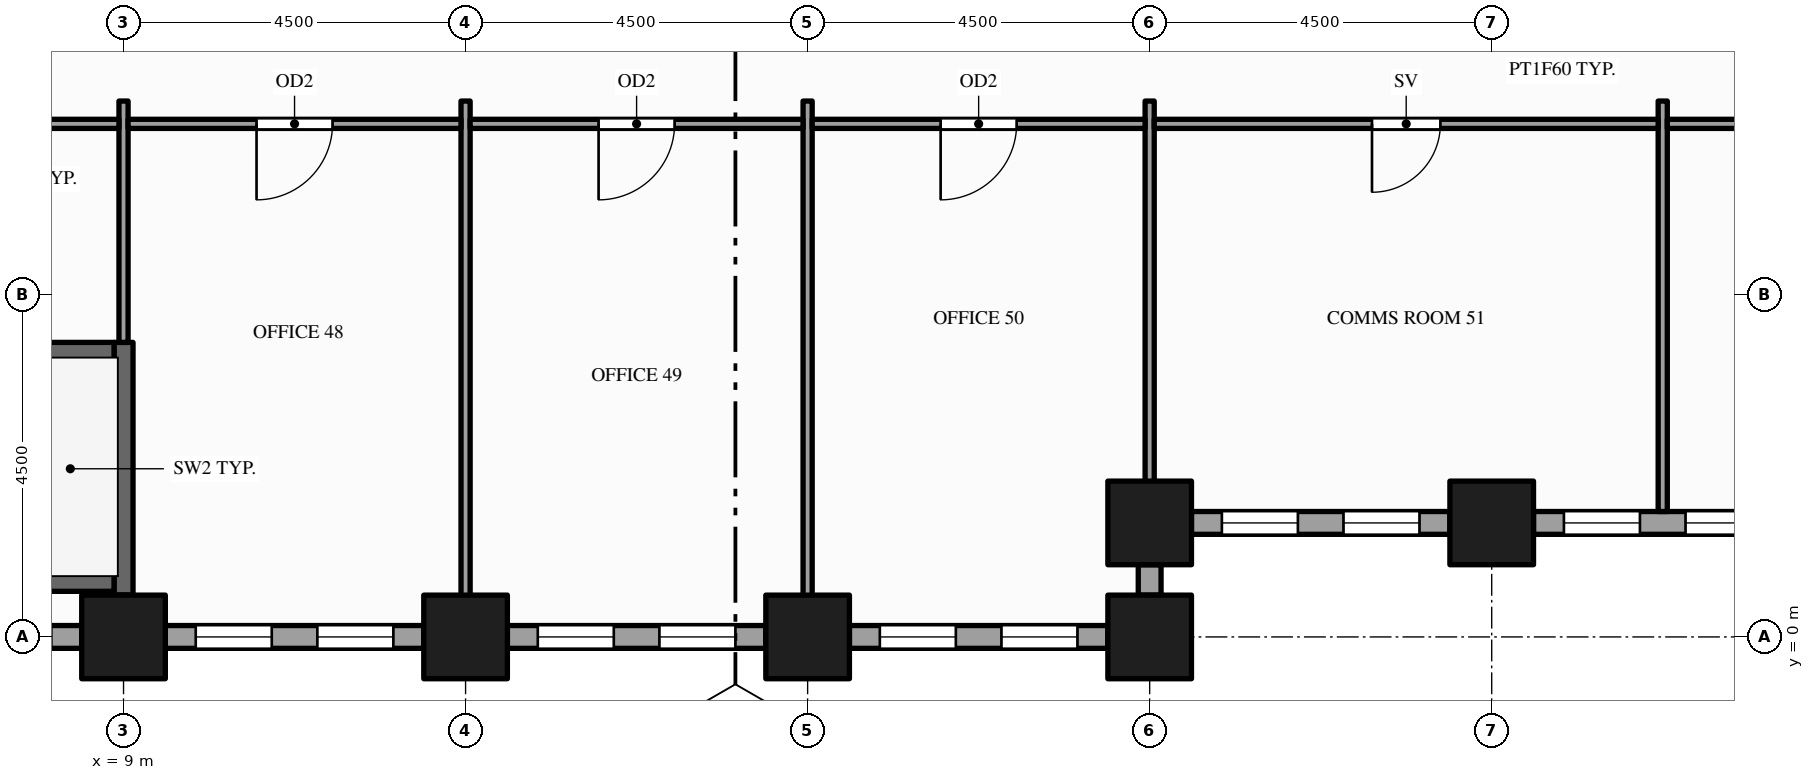
"""IFC4 building model, lengths in metres.
Left out: names, types, materials, properties, quantities, classifications, styles, units other than length and angle.
Written with IfcOpenShell. Run it as: python <this file> out.ifc"""

import sys

from ifc_helpers import new_model, si_unit, direction, frame, frame_2d, origin, origin_2d, place, context, subcontext, project, spatial, rectangle, hollow_rectangle, extrude, element, fill, save


model = new_model("IFC4")
c1 = context("Model", 3, precision=1e-05, world=origin(), true_north=direction((0.0, 1.0)))
c2 = subcontext(c1, "Body", "Model", "MODEL_VIEW")
j1 = project(units=[si_unit("LENGTHUNIT", "METRE"), si_unit("PLANEANGLEUNIT", "RADIAN")], contexts=[c1])
p1 = place(None, origin())
s1 = spatial("IfcSite", under=j1, at=p1, CompositionType="ELEMENT")
p2 = place(p1, origin())
s2 = spatial("IfcBuilding", under=s1, at=p2, CompositionType="ELEMENT")
p3 = place(p2, frame((0.0, 0.0, 57.0)))
s3 = spatial("IfcBuildingStorey", under=s2, at=p3, CompositionType="ELEMENT", Elevation=57.0)
for number, where, z_axis, x_axis in (
    (1, (9.0, 0.0, -0.15), (0.0, 0.0, 1.0), (1.0, 0.0, 0.0)),
    (2, (13.5, 0.0, -0.15), (0.0, 0.0, 1.0), (1.0, 0.0, 0.0)),
    (3, (18.0, 0.0, -0.15), (0.0, 0.0, 1.0), (1.0, 0.0, 0.0)),
    (4, (22.5, 0.0, -0.15), (0.0, 0.0, 1.0), (1.0, 0.0, 0.0)),
    (5, (22.5, 1.5, -0.15), (0.0, 0.0, 1.0), (1.0, 0.0, 0.0)),
    (6, (27.0, 1.5, -0.15), (0.0, 0.0, 1.0), (1.0, 0.0, 0.0)),
):
    element("IfcColumn", number, at=place(p3, frame(where, z_axis=z_axis, x_axis=x_axis)), inside=s3, PredefinedType="COLUMN", context=c2, shape_type="SweptSolid", body=[
        extrude(hollow_rectangle(XDim=1.1, YDim=1.1, WallThickness=0.06, at=origin_2d()), origin(), (0.0, 0.0, 1.0), 4.0),
    ])
p4 = place(p3, frame((5.05, 0.0, 0.0), z_axis=(0.0, 0.0, 1.0), x_axis=(1.0, 0.0, 0.0)))
e7 = element("IfcWall", 7, at=p4, inside=s3, PredefinedType="STANDARD", context=c2, shape_type="SweptSolid", body=[
    extrude(rectangle(XDim=3.4, YDim=0.3, at=frame_2d((1.7, 0.0))), origin(), (0.0, 0.0, 1.0), 3.144),
])
p5 = place(p4, frame((0.4, 0.0, 0.9)))
e8 = element("IfcOpeningElement", 8, at=p5, cuts=e7, PredefinedType="OPENING", context=c2, shape_type="SweptSolid", body=[
    extrude(rectangle(XDim=1.0, YDim=2.0, at=frame_2d((0.5, 1.0))), frame((0.0, 0.16, 0.0), z_axis=(0.0, -1.0, 0.0), x_axis=(1.0, 0.0, 0.0)), (0.0, 0.0, 1.0), 0.32),
])
p6 = place(p4, frame((2.0, 0.0, 0.9)))
e9 = element("IfcOpeningElement", 9, at=p6, cuts=e7, PredefinedType="OPENING", context=c2, shape_type="SweptSolid", body=[
    extrude(rectangle(XDim=1.0, YDim=2.0, at=frame_2d((0.5, 1.0))), frame((0.0, 0.16, 0.0), z_axis=(0.0, -1.0, 0.0), x_axis=(1.0, 0.0, 0.0)), (0.0, 0.0, 1.0), 0.32),
])
p7 = place(p3, frame((9.55, 0.0, 0.0), z_axis=(0.0, 0.0, 1.0), x_axis=(1.0, 0.0, 0.0)))
e10 = element("IfcWall", 10, at=p7, inside=s3, PredefinedType="STANDARD", context=c2, shape_type="SweptSolid", body=[
    extrude(rectangle(XDim=3.4, YDim=0.3, at=frame_2d((1.7, 0.0))), origin(), (0.0, 0.0, 1.0), 3.144),
])
p8 = place(p7, frame((0.4, 0.0, 0.9)))
e11 = element("IfcOpeningElement", 11, at=p8, cuts=e10, PredefinedType="OPENING", context=c2, shape_type="SweptSolid", body=[
    extrude(rectangle(XDim=1.0, YDim=2.0, at=frame_2d((0.5, 1.0))), frame((0.0, 0.16, 0.0), z_axis=(0.0, -1.0, 0.0), x_axis=(1.0, 0.0, 0.0)), (0.0, 0.0, 1.0), 0.32),
])
p9 = place(p7, frame((2.0, 0.0, 0.9)))
e12 = element("IfcOpeningElement", 12, at=p9, cuts=e10, PredefinedType="OPENING", context=c2, shape_type="SweptSolid", body=[
    extrude(rectangle(XDim=1.0, YDim=2.0, at=frame_2d((0.5, 1.0))), frame((0.0, 0.16, 0.0), z_axis=(0.0, -1.0, 0.0), x_axis=(1.0, 0.0, 0.0)), (0.0, 0.0, 1.0), 0.32),
])
p10 = place(p3, frame((14.05, 0.0, 0.0), z_axis=(0.0, 0.0, 1.0), x_axis=(1.0, 0.0, 0.0)))
e13 = element("IfcWall", 13, at=p10, inside=s3, PredefinedType="STANDARD", context=c2, shape_type="SweptSolid", body=[
    extrude(rectangle(XDim=3.4, YDim=0.3, at=frame_2d((1.7, 0.0))), origin(), (0.0, 0.0, 1.0), 3.144),
])
p11 = place(p10, frame((0.4, 0.0, 0.9)))
e14 = element("IfcOpeningElement", 14, at=p11, cuts=e13, PredefinedType="OPENING", context=c2, shape_type="SweptSolid", body=[
    extrude(rectangle(XDim=1.0, YDim=2.0, at=frame_2d((0.5, 1.0))), frame((0.0, 0.16, 0.0), z_axis=(0.0, -1.0, 0.0), x_axis=(1.0, 0.0, 0.0)), (0.0, 0.0, 1.0), 0.32),
])
p12 = place(p10, frame((2.0, 0.0, 0.9)))
e15 = element("IfcOpeningElement", 15, at=p12, cuts=e13, PredefinedType="OPENING", context=c2, shape_type="SweptSolid", body=[
    extrude(rectangle(XDim=1.0, YDim=2.0, at=frame_2d((0.5, 1.0))), frame((0.0, 0.16, 0.0), z_axis=(0.0, -1.0, 0.0), x_axis=(1.0, 0.0, 0.0)), (0.0, 0.0, 1.0), 0.32),
])
p13 = place(p3, frame((18.55, 0.0, 0.0), z_axis=(0.0, 0.0, 1.0), x_axis=(1.0, 0.0, 0.0)))
e16 = element("IfcWall", 16, at=p13, inside=s3, PredefinedType="STANDARD", context=c2, shape_type="SweptSolid", body=[
    extrude(rectangle(XDim=3.4, YDim=0.3, at=frame_2d((1.7, 0.0))), origin(), (0.0, 0.0, 1.0), 3.144),
])
p14 = place(p13, frame((0.4, 0.0, 0.9)))
e17 = element("IfcOpeningElement", 17, at=p14, cuts=e16, PredefinedType="OPENING", context=c2, shape_type="SweptSolid", body=[
    extrude(rectangle(XDim=1.0, YDim=2.0, at=frame_2d((0.5, 1.0))), frame((0.0, 0.16, 0.0), z_axis=(0.0, -1.0, 0.0), x_axis=(1.0, 0.0, 0.0)), (0.0, 0.0, 1.0), 0.32),
])
p15 = place(p13, frame((2.0, 0.0, 0.9)))
e18 = element("IfcOpeningElement", 18, at=p15, cuts=e16, PredefinedType="OPENING", context=c2, shape_type="SweptSolid", body=[
    extrude(rectangle(XDim=1.0, YDim=2.0, at=frame_2d((0.5, 1.0))), frame((0.0, 0.16, 0.0), z_axis=(0.0, -1.0, 0.0), x_axis=(1.0, 0.0, 0.0)), (0.0, 0.0, 1.0), 0.32),
])
p16 = place(p3, frame((22.5, 0.55, 0.0), z_axis=(0.0, 0.0, 1.0), x_axis=(0.0, 1.0, 0.0)))
e19 = element("IfcWall", 19, at=p16, inside=s3, PredefinedType="STANDARD", context=c2, shape_type="SweptSolid", body=[
    extrude(rectangle(XDim=0.4, YDim=0.3, at=frame_2d((0.2, 0.0))), origin(), (0.0, 0.0, 1.0), 3.144),
])
p17 = place(p3, frame((23.05, 1.5, 0.0), z_axis=(0.0, 0.0, 1.0), x_axis=(1.0, 0.0, 0.0)))
e20 = element("IfcWall", 20, at=p17, inside=s3, PredefinedType="STANDARD", context=c2, shape_type="SweptSolid", body=[
    extrude(rectangle(XDim=3.4, YDim=0.3, at=frame_2d((1.7, 0.0))), origin(), (0.0, 0.0, 1.0), 3.144),
])
p18 = place(p17, frame((0.4, 0.0, 0.9)))
e21 = element("IfcOpeningElement", 21, at=p18, cuts=e20, PredefinedType="OPENING", context=c2, shape_type="SweptSolid", body=[
    extrude(rectangle(XDim=1.0, YDim=2.0, at=frame_2d((0.5, 1.0))), frame((0.0, 0.16, 0.0), z_axis=(0.0, -1.0, 0.0), x_axis=(1.0, 0.0, 0.0)), (0.0, 0.0, 1.0), 0.32),
])
p19 = place(p17, frame((2.0, 0.0, 0.9)))
e22 = element("IfcOpeningElement", 22, at=p19, cuts=e20, PredefinedType="OPENING", context=c2, shape_type="SweptSolid", body=[
    extrude(rectangle(XDim=1.0, YDim=2.0, at=frame_2d((0.5, 1.0))), frame((0.0, 0.16, 0.0), z_axis=(0.0, -1.0, 0.0), x_axis=(1.0, 0.0, 0.0)), (0.0, 0.0, 1.0), 0.32),
])
p20 = place(p3, frame((27.55, 1.5, 0.0), z_axis=(0.0, 0.0, 1.0), x_axis=(1.0, 0.0, 0.0)))
e23 = element("IfcWall", 23, at=p20, inside=s3, PredefinedType="STANDARD", context=c2, shape_type="SweptSolid", body=[
    extrude(rectangle(XDim=3.4, YDim=0.3, at=frame_2d((1.7, 0.0))), origin(), (0.0, 0.0, 1.0), 3.144),
])
p21 = place(p20, frame((0.4, 0.0, 0.9)))
e24 = element("IfcOpeningElement", 24, at=p21, cuts=e23, PredefinedType="OPENING", context=c2, shape_type="SweptSolid", body=[
    extrude(rectangle(XDim=1.0, YDim=2.0, at=frame_2d((0.5, 1.0))), frame((0.0, 0.16, 0.0), z_axis=(0.0, -1.0, 0.0), x_axis=(1.0, 0.0, 0.0)), (0.0, 0.0, 1.0), 0.32),
])
p22 = place(p20, frame((2.0, 0.0, 0.9)))
e25 = element("IfcOpeningElement", 25, at=p22, cuts=e23, PredefinedType="OPENING", context=c2, shape_type="SweptSolid", body=[
    extrude(rectangle(XDim=1.0, YDim=2.0, at=frame_2d((0.5, 1.0))), frame((0.0, 0.16, 0.0), z_axis=(0.0, -1.0, 0.0), x_axis=(1.0, 0.0, 0.0)), (0.0, 0.0, 1.0), 0.32),
])
p23 = place(p3, frame((9.0, 0.15, 0.0), z_axis=(0.0, 0.0, 1.0), x_axis=(0.0, 1.0, 0.0)))
e26 = element("IfcWall", 26, at=p23, inside=s3, PredefinedType="PARTITIONING", context=c2, shape_type="SweptSolid", body=[
    extrude(rectangle(XDim=0.4, YDim=0.12, at=frame_2d((0.2, 0.0))), origin(), (0.0, 0.0, 1.0), 3.85),
])
p24 = place(p3, frame((9.0, 0.55, 0.0), z_axis=(0.0, 0.0, 1.0), x_axis=(0.0, 1.0, 0.0)))
e27 = element("IfcWall", 27, at=p24, inside=s3, PredefinedType="SHEAR", context=c2, shape_type="SweptSolid", body=[
    extrude(rectangle(XDim=3.325, YDim=0.25, at=frame_2d((1.663, 0.0))), origin(), (0.0, 0.0, 1.0), 3.85),
])
p25 = place(p3, frame((9.0, 3.875, 0.0), z_axis=(0.0, 0.0, 1.0), x_axis=(0.0, 1.0, 0.0)))
e28 = element("IfcWall", 28, at=p25, inside=s3, PredefinedType="PARTITIONING", context=c2, shape_type="SweptSolid", body=[
    extrude(rectangle(XDim=3.175, YDim=0.12, at=frame_2d((1.587, 0.0))), origin(), (0.0, 0.0, 1.0), 2.938),
])
for number, where, z_axis, x_axis in (
    (29, (13.5, 0.15, 0.0), (0.0, 0.0, 1.0), (0.0, 1.0, 0.0)),
    (30, (18.0, 0.15, 0.0), (0.0, 0.0, 1.0), (0.0, 1.0, 0.0)),
):
    element("IfcWall", number, at=place(p3, frame(where, z_axis=z_axis, x_axis=x_axis)), inside=s3, PredefinedType="PARTITIONING", context=c2, shape_type="SweptSolid", body=[
        extrude(rectangle(XDim=6.9, YDim=0.12, at=frame_2d((3.45, 0.0))), origin(), (0.0, 0.0, 1.0), 2.938),
    ])
for number, where, z_axis, x_axis in (
    (31, (22.5, 1.65, 0.0), (0.0, 0.0, 1.0), (0.0, 1.0, 0.0)),
    (32, (29.25, 1.65, 0.0), (0.0, 0.0, 1.0), (0.0, 1.0, 0.0)),
):
    element("IfcWall", number, at=place(p3, frame(where, z_axis=z_axis, x_axis=x_axis)), inside=s3, PredefinedType="PARTITIONING", context=c2, shape_type="SweptSolid", body=[
        extrude(rectangle(XDim=5.4, YDim=0.12, at=frame_2d((2.7, 0.0))), origin(), (0.0, 0.0, 1.0), 2.938),
    ])
p26 = place(p3, frame((0.85, 0.725, 0.0), z_axis=(0.0, 0.0, 1.0), x_axis=(1.0, 0.0, 0.0)))
e33 = element("IfcWall", 33, at=p26, inside=s3, PredefinedType="SHEAR", context=c2, shape_type="SweptSolid", body=[
    extrude(rectangle(XDim=8.025, YDim=0.25, at=frame_2d((4.012, 0.0))), origin(), (0.0, 0.0, 1.0), 3.85),
])
p27 = place(p3, frame((0.85, 3.75, 0.0), z_axis=(0.0, 0.0, 1.0), x_axis=(1.0, 0.0, 0.0)))
e34 = element("IfcWall", 34, at=p27, inside=s3, PredefinedType="SHEAR", context=c2, shape_type="SweptSolid", body=[
    extrude(rectangle(XDim=8.025, YDim=0.25, at=frame_2d((4.012, 0.0))), origin(), (0.0, 0.0, 1.0), 3.85),
])
p28 = place(p27, frame((0.15, 0.0, 0.0)))
e35 = element("IfcOpeningElement", 35, at=p28, cuts=e34, PredefinedType="OPENING", context=c2, shape_type="SweptSolid", body=[
    extrude(rectangle(XDim=1.1, YDim=2.1, at=frame_2d((0.55, 1.05))), frame((0.0, 0.135, 0.0), z_axis=(0.0, -1.0, 0.0), x_axis=(1.0, 0.0, 0.0)), (0.0, 0.0, 1.0), 0.27),
])
p29 = place(p3, frame((0.15, 6.75, 0.0), z_axis=(0.0, 0.0, 1.0), x_axis=(1.0, 0.0, 0.0)))
e36 = element("IfcWall", 36, at=p29, inside=s3, PredefinedType="PARTITIONING", context=c2, shape_type="SweptSolid", body=[
    extrude(rectangle(XDim=8.79, YDim=0.12, at=frame_2d((4.395, 0.0))), origin(), (0.0, 0.0, 1.0), 2.938),
])
p30 = place(p29, frame((3.805, 0.0, 0.0)))
e37 = element("IfcOpeningElement", 37, at=p30, cuts=e36, PredefinedType="OPENING", context=c2, shape_type="SweptSolid", body=[
    extrude(rectangle(XDim=1.2, YDim=2.1, at=frame_2d((0.6, 1.05))), frame((0.0, 0.07, 0.0), z_axis=(0.0, -1.0, 0.0), x_axis=(1.0, 0.0, 0.0)), (0.0, 0.0, 1.0), 0.14),
])
p31 = place(p3, frame((9.06, 6.75, 0.0), z_axis=(0.0, 0.0, 1.0), x_axis=(1.0, 0.0, 0.0)))
e38 = element("IfcWall", 38, at=p31, inside=s3, PredefinedType="PARTITIONING", context=c2, shape_type="SweptSolid", body=[
    extrude(rectangle(XDim=4.38, YDim=0.12, at=frame_2d((2.19, 0.0))), origin(), (0.0, 0.0, 1.0), 2.938),
])
p32 = place(p31, frame((1.69, 0.0, 0.0)))
e39 = element("IfcOpeningElement", 39, at=p32, cuts=e38, PredefinedType="OPENING", context=c2, shape_type="SweptSolid", body=[
    extrude(rectangle(XDim=1.0, YDim=2.1, at=frame_2d((0.5, 1.05))), frame((0.0, 0.07, 0.0), z_axis=(0.0, -1.0, 0.0), x_axis=(1.0, 0.0, 0.0)), (0.0, 0.0, 1.0), 0.14),
])
p33 = place(p3, frame((13.56, 6.75, 0.0), z_axis=(0.0, 0.0, 1.0), x_axis=(1.0, 0.0, 0.0)))
e40 = element("IfcWall", 40, at=p33, inside=s3, PredefinedType="PARTITIONING", context=c2, shape_type="SweptSolid", body=[
    extrude(rectangle(XDim=4.38, YDim=0.12, at=frame_2d((2.19, 0.0))), origin(), (0.0, 0.0, 1.0), 2.938),
])
p34 = place(p33, frame((1.69, 0.0, 0.0)))
e41 = element("IfcOpeningElement", 41, at=p34, cuts=e40, PredefinedType="OPENING", context=c2, shape_type="SweptSolid", body=[
    extrude(rectangle(XDim=1.0, YDim=2.1, at=frame_2d((0.5, 1.05))), frame((0.0, 0.07, 0.0), z_axis=(0.0, -1.0, 0.0), x_axis=(1.0, 0.0, 0.0)), (0.0, 0.0, 1.0), 0.14),
])
p35 = place(p3, frame((18.06, 6.75, 0.0), z_axis=(0.0, 0.0, 1.0), x_axis=(1.0, 0.0, 0.0)))
e42 = element("IfcWall", 42, at=p35, inside=s3, PredefinedType="PARTITIONING", context=c2, shape_type="SweptSolid", body=[
    extrude(rectangle(XDim=4.38, YDim=0.12, at=frame_2d((2.19, 0.0))), origin(), (0.0, 0.0, 1.0), 2.938),
])
p36 = place(p35, frame((1.69, 0.0, 0.0)))
e43 = element("IfcOpeningElement", 43, at=p36, cuts=e42, PredefinedType="OPENING", context=c2, shape_type="SweptSolid", body=[
    extrude(rectangle(XDim=1.0, YDim=2.1, at=frame_2d((0.5, 1.05))), frame((0.0, 0.07, 0.0), z_axis=(0.0, -1.0, 0.0), x_axis=(1.0, 0.0, 0.0)), (0.0, 0.0, 1.0), 0.14),
])
p37 = place(p3, frame((22.56, 6.75, 0.0), z_axis=(0.0, 0.0, 1.0), x_axis=(1.0, 0.0, 0.0)))
e44 = element("IfcWall", 44, at=p37, inside=s3, PredefinedType="PARTITIONING", context=c2, shape_type="SweptSolid", body=[
    extrude(rectangle(XDim=6.63, YDim=0.12, at=frame_2d((3.315, 0.0))), origin(), (0.0, 0.0, 1.0), 2.938),
])
p38 = place(p37, frame((2.865, 0.0, 0.0)))
e45 = element("IfcOpeningElement", 45, at=p38, cuts=e44, PredefinedType="OPENING", context=c2, shape_type="SweptSolid", body=[
    extrude(rectangle(XDim=0.9, YDim=2.1, at=frame_2d((0.45, 1.05))), frame((0.0, 0.07, 0.0), z_axis=(0.0, -1.0, 0.0), x_axis=(1.0, 0.0, 0.0)), (0.0, 0.0, 1.0), 0.14),
])
p39 = place(p3, frame((29.31, 6.75, 0.0), z_axis=(0.0, 0.0, 1.0), x_axis=(1.0, 0.0, 0.0)))
e46 = element("IfcWall", 46, at=p39, inside=s3, PredefinedType="PARTITIONING", context=c2, shape_type="SweptSolid", body=[
    extrude(rectangle(XDim=4.38, YDim=0.12, at=frame_2d((2.19, 0.0))), origin(), (0.0, 0.0, 1.0), 2.938),
])
p40 = place(p39, frame((1.69, 0.0, 0.0)))
e47 = element("IfcOpeningElement", 47, at=p40, cuts=e46, PredefinedType="OPENING", context=c2, shape_type="SweptSolid", body=[
    extrude(rectangle(XDim=1.0, YDim=2.1, at=frame_2d((0.5, 1.05))), frame((0.0, 0.07, 0.0), z_axis=(0.0, -1.0, 0.0), x_axis=(1.0, 0.0, 0.0)), (0.0, 0.0, 1.0), 0.14),
])
p41 = place(p8, origin())
e48 = element("IfcWindow", 48, at=p41, inside=s3, PartitioningType="SINGLE_PANEL", PredefinedType="WINDOW", context=c2, shape_type="SweptSolid", body=[
    extrude(rectangle(XDim=1.0, YDim=2.0, at=frame_2d((0.5, 1.0))), frame((0.0, 0.03, 0.0), z_axis=(0.0, -1.0, 0.0), x_axis=(1.0, 0.0, 0.0)), (0.0, 0.0, 1.0), 0.06),
])
fill(e11, e48)
p42 = place(p9, origin())
e49 = element("IfcWindow", 49, at=p42, inside=s3, PartitioningType="SINGLE_PANEL", PredefinedType="WINDOW", context=c2, shape_type="SweptSolid", body=[
    extrude(rectangle(XDim=1.0, YDim=2.0, at=frame_2d((0.5, 1.0))), frame((0.0, 0.03, 0.0), z_axis=(0.0, -1.0, 0.0), x_axis=(1.0, 0.0, 0.0)), (0.0, 0.0, 1.0), 0.06),
])
fill(e12, e49)
p43 = place(p11, origin())
e50 = element("IfcWindow", 50, at=p43, inside=s3, PartitioningType="SINGLE_PANEL", PredefinedType="WINDOW", context=c2, shape_type="SweptSolid", body=[
    extrude(rectangle(XDim=1.0, YDim=2.0, at=frame_2d((0.5, 1.0))), frame((0.0, 0.03, 0.0), z_axis=(0.0, -1.0, 0.0), x_axis=(1.0, 0.0, 0.0)), (0.0, 0.0, 1.0), 0.06),
])
fill(e14, e50)
p44 = place(p12, origin())
e51 = element("IfcWindow", 51, at=p44, inside=s3, PartitioningType="SINGLE_PANEL", PredefinedType="WINDOW", context=c2, shape_type="SweptSolid", body=[
    extrude(rectangle(XDim=1.0, YDim=2.0, at=frame_2d((0.5, 1.0))), frame((0.0, 0.03, 0.0), z_axis=(0.0, -1.0, 0.0), x_axis=(1.0, 0.0, 0.0)), (0.0, 0.0, 1.0), 0.06),
])
fill(e15, e51)
p45 = place(p14, origin())
e52 = element("IfcWindow", 52, at=p45, inside=s3, PartitioningType="SINGLE_PANEL", PredefinedType="WINDOW", context=c2, shape_type="SweptSolid", body=[
    extrude(rectangle(XDim=1.0, YDim=2.0, at=frame_2d((0.5, 1.0))), frame((0.0, 0.03, 0.0), z_axis=(0.0, -1.0, 0.0), x_axis=(1.0, 0.0, 0.0)), (0.0, 0.0, 1.0), 0.06),
])
fill(e17, e52)
p46 = place(p15, origin())
e53 = element("IfcWindow", 53, at=p46, inside=s3, PartitioningType="SINGLE_PANEL", PredefinedType="WINDOW", context=c2, shape_type="SweptSolid", body=[
    extrude(rectangle(XDim=1.0, YDim=2.0, at=frame_2d((0.5, 1.0))), frame((0.0, 0.03, 0.0), z_axis=(0.0, -1.0, 0.0), x_axis=(1.0, 0.0, 0.0)), (0.0, 0.0, 1.0), 0.06),
])
fill(e18, e53)
p47 = place(p18, origin())
e54 = element("IfcWindow", 54, at=p47, inside=s3, PartitioningType="SINGLE_PANEL", PredefinedType="WINDOW", context=c2, shape_type="SweptSolid", body=[
    extrude(rectangle(XDim=1.0, YDim=2.0, at=frame_2d((0.5, 1.0))), frame((0.0, 0.03, 0.0), z_axis=(0.0, -1.0, 0.0), x_axis=(1.0, 0.0, 0.0)), (0.0, 0.0, 1.0), 0.06),
])
fill(e21, e54)
p48 = place(p19, origin())
e55 = element("IfcWindow", 55, at=p48, inside=s3, PartitioningType="SINGLE_PANEL", PredefinedType="WINDOW", context=c2, shape_type="SweptSolid", body=[
    extrude(rectangle(XDim=1.0, YDim=2.0, at=frame_2d((0.5, 1.0))), frame((0.0, 0.03, 0.0), z_axis=(0.0, -1.0, 0.0), x_axis=(1.0, 0.0, 0.0)), (0.0, 0.0, 1.0), 0.06),
])
fill(e22, e55)
p49 = place(p21, origin())
e56 = element("IfcWindow", 56, at=p49, inside=s3, PartitioningType="SINGLE_PANEL", PredefinedType="WINDOW", context=c2, shape_type="SweptSolid", body=[
    extrude(rectangle(XDim=1.0, YDim=2.0, at=frame_2d((0.5, 1.0))), frame((0.0, 0.03, 0.0), z_axis=(0.0, -1.0, 0.0), x_axis=(1.0, 0.0, 0.0)), (0.0, 0.0, 1.0), 0.06),
])
fill(e24, e56)
p50 = place(p22, origin())
e57 = element("IfcWindow", 57, at=p50, inside=s3, PartitioningType="SINGLE_PANEL", PredefinedType="WINDOW", context=c2, shape_type="SweptSolid", body=[
    extrude(rectangle(XDim=1.0, YDim=2.0, at=frame_2d((0.5, 1.0))), frame((0.0, 0.03, 0.0), z_axis=(0.0, -1.0, 0.0), x_axis=(1.0, 0.0, 0.0)), (0.0, 0.0, 1.0), 0.06),
])
fill(e25, e57)
p51 = place(p32, origin())
e58 = element("IfcDoor", 58, at=p51, inside=s3, OperationType="SINGLE_SWING_LEFT", PredefinedType="DOOR", context=c2, shape_type="SweptSolid", body=[
    extrude(rectangle(XDim=1.0, YDim=2.1, at=frame_2d((0.5, 1.05))), frame((0.0, 0.025, 0.0), z_axis=(0.0, -1.0, 0.0), x_axis=(1.0, 0.0, 0.0)), (0.0, 0.0, 1.0), 0.05),
])
fill(e39, e58)
p52 = place(p34, origin())
e59 = element("IfcDoor", 59, at=p52, inside=s3, OperationType="SINGLE_SWING_LEFT", PredefinedType="DOOR", context=c2, shape_type="SweptSolid", body=[
    extrude(rectangle(XDim=1.0, YDim=2.1, at=frame_2d((0.5, 1.05))), frame((0.0, 0.025, 0.0), z_axis=(0.0, -1.0, 0.0), x_axis=(1.0, 0.0, 0.0)), (0.0, 0.0, 1.0), 0.05),
])
fill(e41, e59)
p53 = place(p36, origin())
e60 = element("IfcDoor", 60, at=p53, inside=s3, OperationType="SINGLE_SWING_LEFT", PredefinedType="DOOR", context=c2, shape_type="SweptSolid", body=[
    extrude(rectangle(XDim=1.0, YDim=2.1, at=frame_2d((0.5, 1.05))), frame((0.0, 0.025, 0.0), z_axis=(0.0, -1.0, 0.0), x_axis=(1.0, 0.0, 0.0)), (0.0, 0.0, 1.0), 0.05),
])
fill(e43, e60)
p54 = place(p38, origin())
e61 = element("IfcDoor", 61, at=p54, inside=s3, OperationType="SINGLE_SWING_LEFT", PredefinedType="DOOR", context=c2, shape_type="SweptSolid", body=[
    extrude(rectangle(XDim=0.9, YDim=2.1, at=frame_2d((0.45, 1.05))), frame((0.0, 0.025, 0.0), z_axis=(0.0, -1.0, 0.0), x_axis=(1.0, 0.0, 0.0)), (0.0, 0.0, 1.0), 0.05),
])
fill(e45, e61)
save(model, sys.argv[1])
